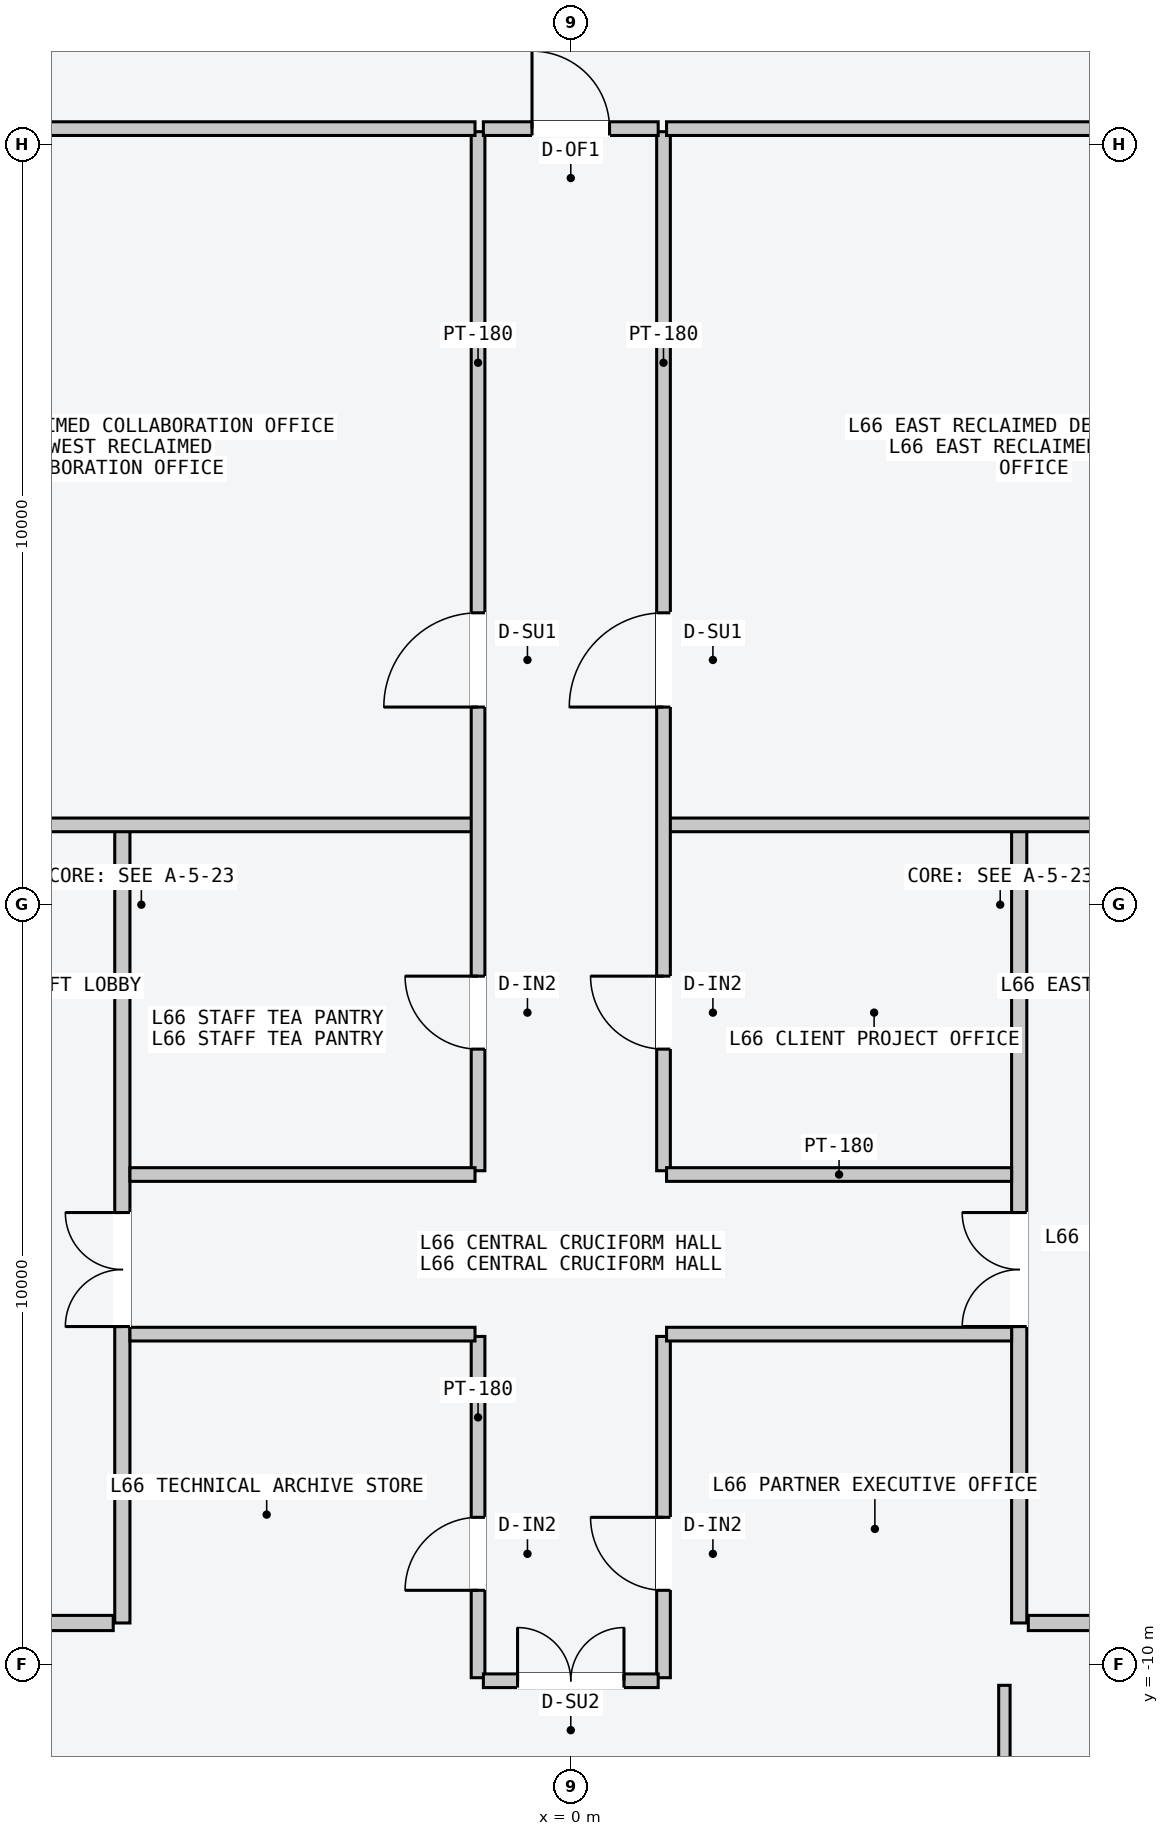
"""IFC4 building model, lengths in metres.
Left out: names, types, materials, properties, quantities, classifications, styles, units other than length and angle.
Written with IfcOpenShell. Run it as: python <this file> out.ifc"""

import sys

from ifc_helpers import new_model, si_unit, direction, frame, frame_2d, origin, place, context, subcontext, project, spatial, rectangle, extrude, element, fill, save


model = new_model("IFC4")
c1 = context("Model", 3, precision=1e-05, world=origin(), true_north=direction((0.0, 1.0)))
c2 = subcontext(c1, "Body", "Model", "MODEL_VIEW")
j1 = project(units=[si_unit("LENGTHUNIT", "METRE"), si_unit("PLANEANGLEUNIT", "RADIAN")], contexts=[c1])
p1 = place(None, origin())
s1 = spatial("IfcSite", under=j1, at=p1, CompositionType="ELEMENT")
p2 = place(p1, origin())
s2 = spatial("IfcBuilding", under=s1, at=p2, CompositionType="ELEMENT")
p3 = place(p2, frame((0.0, 0.0, 250.8)))
s3 = spatial("IfcBuildingStorey", under=s2, at=p3, CompositionType="ELEMENT", Elevation=250.8)
p4 = place(p3, frame((-5.9, -9.45, 0.0), z_axis=(0.0, 0.0, 1.0), x_axis=(0.0, 1.0, 0.0)))
e1 = element("IfcWall", 1, at=p4, inside=s3, PredefinedType="PARTITIONING", context=c2, shape_type="SweptSolid", body=[
    extrude(rectangle(XDim=10.5, YDim=0.2, at=frame_2d((5.25, 0.0))), origin(), (0.0, 0.0, 1.0), 3.4),
])
p5 = place(p4, frame((3.9, 0.0, 0.0)))
e2 = element("IfcOpeningElement", 2, at=p5, cuts=e1, PredefinedType="OPENING", context=c2, shape_type="SweptSolid", body=[
    extrude(rectangle(XDim=1.5, YDim=2.2, at=frame_2d((0.75, 1.1))), frame((0.0, 0.11, 0.0), z_axis=(0.0, -1.0, 0.0), x_axis=(1.0, 0.0, 0.0)), (0.0, 0.0, 1.0), 0.22),
])
p6 = place(p3, frame((-6.02, -9.45, 0.0), z_axis=(0.0, 0.0, 1.0), x_axis=(-1.0, 0.0, 0.0)))
e3 = element("IfcWall", 3, at=p6, inside=s3, PredefinedType="PARTITIONING", context=c2, shape_type="SweptSolid", body=[
    extrude(rectangle(XDim=1.8, YDim=0.2, at=frame_2d((0.9, 0.0))), origin(), (0.0, 0.0, 1.0), 3.4),
])
p7 = place(p3, frame((5.9, -9.45, 0.0), z_axis=(0.0, 0.0, 1.0), x_axis=(0.0, 1.0, 0.0)))
e4 = element("IfcWall", 4, at=p7, inside=s3, PredefinedType="PARTITIONING", context=c2, shape_type="SweptSolid", body=[
    extrude(rectangle(XDim=10.5, YDim=0.2, at=frame_2d((5.25, 0.0))), origin(), (0.0, 0.0, 1.0), 3.4),
])
p8 = place(p7, frame((3.9, 0.0, 0.0)))
e5 = element("IfcOpeningElement", 5, at=p8, cuts=e4, PredefinedType="OPENING", context=c2, shape_type="SweptSolid", body=[
    extrude(rectangle(XDim=1.5, YDim=2.2, at=frame_2d((0.75, 1.1))), frame((0.0, 0.11, 0.0), z_axis=(0.0, -1.0, 0.0), x_axis=(1.0, 0.0, 0.0)), (0.0, 0.0, 1.0), 0.22),
])
p9 = place(p3, frame((6.02, -9.45, 0.0), z_axis=(0.0, 0.0, 1.0), x_axis=(1.0, 0.0, 0.0)))
e6 = element("IfcWall", 6, at=p9, inside=s3, PredefinedType="PARTITIONING", context=c2, shape_type="SweptSolid", body=[
    extrude(rectangle(XDim=1.8, YDim=0.2, at=frame_2d((0.9, 0.0))), origin(), (0.0, 0.0, 1.0), 3.4),
])
p10 = place(p3, frame((-10.05, 1.05, 0.0), z_axis=(0.0, 0.0, 1.0), x_axis=(1.0, 0.0, 0.0)))
e7 = element("IfcWall", 7, at=p10, inside=s3, PredefinedType="PARTITIONING", context=c2, shape_type="SweptSolid", body=[
    extrude(rectangle(XDim=8.79, YDim=0.18, at=frame_2d((4.395, 0.0))), origin(), (0.0, 0.0, 1.0), 3.4),
])
p11 = place(p3, frame((-1.22, -3.5, 0.0), z_axis=(0.0, 0.0, 1.0), x_axis=(0.0, 1.0, 0.0)))
e8 = element("IfcWall", 8, at=p11, inside=s3, PredefinedType="PARTITIONING", context=c2, shape_type="SweptSolid", body=[
    extrude(rectangle(XDim=13.67, YDim=0.18, at=frame_2d((6.835, 0.0))), origin(), (0.0, 0.0, 1.0), 3.4),
])
p12 = place(p11, frame((6.1, 0.0, 0.0)))
e9 = element("IfcOpeningElement", 9, at=p12, cuts=e8, PredefinedType="OPENING", context=c2, shape_type="SweptSolid", body=[
    extrude(rectangle(XDim=1.24, YDim=2.24, at=frame_2d((0.62, 1.12))), frame((0.0, 0.1, 0.0), z_axis=(0.0, -1.0, 0.0), x_axis=(1.0, 0.0, 0.0)), (0.0, 0.0, 1.0), 0.2),
])
p13 = place(p11, frame((1.6, 0.0, 0.0)))
e10 = element("IfcOpeningElement", 10, at=p13, cuts=e8, PredefinedType="OPENING", context=c2, shape_type="SweptSolid", body=[
    extrude(rectangle(XDim=0.96, YDim=2.18, at=frame_2d((0.48, 1.09))), frame((0.0, 0.1, 0.0), z_axis=(0.0, -1.0, 0.0), x_axis=(1.0, 0.0, 0.0)), (0.0, 0.0, 1.0), 0.2),
])
p14 = place(p3, frame((-7.5, 10.21, 0.0), z_axis=(0.0, 0.0, 1.0), x_axis=(1.0, 0.0, 0.0)))
e11 = element("IfcWall", 11, at=p14, inside=s3, PredefinedType="PARTITIONING", context=c2, shape_type="SweptSolid", body=[
    extrude(rectangle(XDim=6.24, YDim=0.18, at=frame_2d((3.12, 0.0))), origin(), (0.0, 0.0, 1.0), 3.4),
])
p15 = place(p3, frame((-5.8, -3.55, 0.0), z_axis=(0.0, 0.0, 1.0), x_axis=(1.0, 0.0, 0.0)))
e12 = element("IfcWall", 12, at=p15, inside=s3, PredefinedType="PARTITIONING", context=c2, shape_type="SweptSolid", body=[
    extrude(rectangle(XDim=4.54, YDim=0.18, at=frame_2d((2.27, 0.0))), origin(), (0.0, 0.0, 1.0), 3.4),
])
p16 = place(p3, frame((1.26, 1.05, 0.0), z_axis=(0.0, 0.0, 1.0), x_axis=(1.0, 0.0, 0.0)))
e13 = element("IfcWall", 13, at=p16, inside=s3, PredefinedType="PARTITIONING", context=c2, shape_type="SweptSolid", body=[
    extrude(rectangle(XDim=8.8, YDim=0.18, at=frame_2d((4.4, 0.0))), origin(), (0.0, 0.0, 1.0), 3.4),
])
p17 = place(p3, frame((1.22, -3.5, 0.0), z_axis=(0.0, 0.0, 1.0), x_axis=(0.0, 1.0, 0.0)))
e14 = element("IfcWall", 14, at=p17, inside=s3, PredefinedType="PARTITIONING", context=c2, shape_type="SweptSolid", body=[
    extrude(rectangle(XDim=13.67, YDim=0.18, at=frame_2d((6.835, 0.0))), origin(), (0.0, 0.0, 1.0), 3.4),
])
p18 = place(p17, frame((6.1, 0.0, 0.0)))
e15 = element("IfcOpeningElement", 15, at=p18, cuts=e14, PredefinedType="OPENING", context=c2, shape_type="SweptSolid", body=[
    extrude(rectangle(XDim=1.24, YDim=2.24, at=frame_2d((0.62, 1.12))), frame((0.0, 0.1, 0.0), z_axis=(0.0, -1.0, 0.0), x_axis=(1.0, 0.0, 0.0)), (0.0, 0.0, 1.0), 0.2),
])
p19 = place(p17, frame((1.6, 0.0, 0.0)))
e16 = element("IfcOpeningElement", 16, at=p19, cuts=e14, PredefinedType="OPENING", context=c2, shape_type="SweptSolid", body=[
    extrude(rectangle(XDim=0.96, YDim=2.18, at=frame_2d((0.48, 1.09))), frame((0.0, 0.1, 0.0), z_axis=(0.0, -1.0, 0.0), x_axis=(1.0, 0.0, 0.0)), (0.0, 0.0, 1.0), 0.2),
])
p20 = place(p3, frame((1.26, 10.21, 0.0), z_axis=(0.0, 0.0, 1.0), x_axis=(1.0, 0.0, 0.0)))
e17 = element("IfcWall", 17, at=p20, inside=s3, PredefinedType="PARTITIONING", context=c2, shape_type="SweptSolid", body=[
    extrude(rectangle(XDim=6.24, YDim=0.18, at=frame_2d((3.12, 0.0))), origin(), (0.0, 0.0, 1.0), 3.4),
])
p21 = place(p3, frame((1.26, -3.55, 0.0), z_axis=(0.0, 0.0, 1.0), x_axis=(1.0, 0.0, 0.0)))
e18 = element("IfcWall", 18, at=p21, inside=s3, PredefinedType="PARTITIONING", context=c2, shape_type="SweptSolid", body=[
    extrude(rectangle(XDim=4.54, YDim=0.18, at=frame_2d((2.27, 0.0))), origin(), (0.0, 0.0, 1.0), 3.4),
])
p22 = place(p3, frame((-1.22, -10.17, 0.0), z_axis=(0.0, 0.0, 1.0), x_axis=(0.0, 1.0, 0.0)))
e19 = element("IfcWall", 19, at=p22, inside=s3, PredefinedType="PARTITIONING", context=c2, shape_type="SweptSolid", body=[
    extrude(rectangle(XDim=4.49, YDim=0.18, at=frame_2d((2.245, 0.0))), origin(), (0.0, 0.0, 1.0), 3.4),
])
p23 = place(p22, frame((1.15, 0.0, 0.0)))
e20 = element("IfcOpeningElement", 20, at=p23, cuts=e19, PredefinedType="OPENING", context=c2, shape_type="SweptSolid", body=[
    extrude(rectangle(XDim=0.96, YDim=2.18, at=frame_2d((0.48, 1.09))), frame((0.0, 0.1, 0.0), z_axis=(0.0, -1.0, 0.0), x_axis=(1.0, 0.0, 0.0)), (0.0, 0.0, 1.0), 0.2),
])
p24 = place(p3, frame((1.22, -10.17, 0.0), z_axis=(0.0, 0.0, 1.0), x_axis=(0.0, 1.0, 0.0)))
e21 = element("IfcWall", 21, at=p24, inside=s3, PredefinedType="PARTITIONING", context=c2, shape_type="SweptSolid", body=[
    extrude(rectangle(XDim=4.49, YDim=0.18, at=frame_2d((2.245, 0.0))), origin(), (0.0, 0.0, 1.0), 3.4),
])
p25 = place(p24, frame((1.15, 0.0, 0.0)))
e22 = element("IfcOpeningElement", 22, at=p25, cuts=e21, PredefinedType="OPENING", context=c2, shape_type="SweptSolid", body=[
    extrude(rectangle(XDim=0.96, YDim=2.18, at=frame_2d((0.48, 1.09))), frame((0.0, 0.1, 0.0), z_axis=(0.0, -1.0, 0.0), x_axis=(1.0, 0.0, 0.0)), (0.0, 0.0, 1.0), 0.2),
])
for number, where, z_axis, x_axis in (
    (23, (-5.8, -5.65, 0.0), (0.0, 0.0, 1.0), (1.0, 0.0, 0.0)),
    (24, (1.26, -5.65, 0.0), (0.0, 0.0, 1.0), (1.0, 0.0, 0.0)),
):
    element("IfcWall", number, at=place(p3, frame(where, z_axis=z_axis, x_axis=x_axis)), inside=s3, PredefinedType="PARTITIONING", context=c2, shape_type="SweptSolid", body=[
        extrude(rectangle(XDim=4.54, YDim=0.18, at=frame_2d((2.27, 0.0))), origin(), (0.0, 0.0, 1.0), 3.4),
    ])
p26 = place(p3, frame((-1.15, 10.21, 0.0), z_axis=(0.0, 0.0, 1.0), x_axis=(1.0, 0.0, 0.0)))
e25 = element("IfcWall", 25, at=p26, inside=s3, PredefinedType="PARTITIONING", context=c2, shape_type="SweptSolid", body=[
    extrude(rectangle(XDim=2.3, YDim=0.18, at=frame_2d((1.15, 0.0))), origin(), (0.0, 0.0, 1.0), 3.4),
])
p27 = place(p26, frame((0.64, 0.0, 0.0)))
e26 = element("IfcOpeningElement", 26, at=p27, cuts=e25, PredefinedType="OPENING", context=c2, shape_type="SweptSolid", body=[
    extrude(rectangle(XDim=1.02, YDim=2.2, at=frame_2d((0.51, 1.1))), frame((0.0, 0.1, 0.0), z_axis=(0.0, -1.0, 0.0), x_axis=(1.0, 0.0, 0.0)), (0.0, 0.0, 1.0), 0.2),
])
p28 = place(p3, frame((5.705, -17.56, 0.0), z_axis=(0.0, 0.0, 1.0), x_axis=(0.0, 1.0, 0.0)))
e27 = element("IfcWall", 27, at=p28, inside=s3, PredefinedType="PARTITIONING", context=c2, shape_type="SweptSolid", body=[
    extrude(rectangle(XDim=7.29, YDim=0.15, at=frame_2d((3.645, 0.0))), origin(), (0.0, 0.0, 1.0), 3.4),
])
p29 = place(p28, frame((1.05, 0.0, 0.0)))
e28 = element("IfcOpeningElement", 28, at=p29, cuts=e27, PredefinedType="OPENING", context=c2, shape_type="SweptSolid", body=[
    extrude(rectangle(XDim=0.96, YDim=2.18, at=frame_2d((0.48, 1.09))), frame((0.0, 0.085, 0.0), z_axis=(0.0, -1.0, 0.0), x_axis=(1.0, 0.0, 0.0)), (0.0, 0.0, 1.0), 0.17),
])
p30 = place(p3, frame((-1.15, -10.21, 0.0), z_axis=(0.0, 0.0, 1.0), x_axis=(1.0, 0.0, 0.0)))
e29 = element("IfcWall", 29, at=p30, inside=s3, PredefinedType="PARTITIONING", context=c2, shape_type="SweptSolid", body=[
    extrude(rectangle(XDim=2.3, YDim=0.18, at=frame_2d((1.15, 0.0))), origin(), (0.0, 0.0, 1.0), 3.4),
])
p31 = place(p30, frame((0.45, 0.0, 0.0)))
e30 = element("IfcOpeningElement", 30, at=p31, cuts=e29, PredefinedType="OPENING", context=c2, shape_type="SweptSolid", body=[
    extrude(rectangle(XDim=1.4, YDim=2.2, at=frame_2d((0.7, 1.1))), frame((0.0, 0.1, 0.0), z_axis=(0.0, -1.0, 0.0), x_axis=(1.0, 0.0, 0.0)), (0.0, 0.0, 1.0), 0.2),
])
p32 = place(p5, origin())
e31 = element("IfcDoor", 31, at=p32, inside=s3, OperationType="DOUBLE_DOOR_SINGLE_SWING", PredefinedType="DOOR", context=c2, shape_type="SweptSolid", body=[
    extrude(rectangle(XDim=1.5, YDim=2.2, at=frame_2d((0.75, 1.1))), frame((0.0, 0.025, 0.0), z_axis=(0.0, -1.0, 0.0), x_axis=(1.0, 0.0, 0.0)), (0.0, 0.0, 1.0), 0.05),
])
fill(e2, e31)
p33 = place(p8, origin())
e32 = element("IfcDoor", 32, at=p33, inside=s3, OperationType="DOUBLE_DOOR_SINGLE_SWING", PredefinedType="DOOR", context=c2, shape_type="SweptSolid", body=[
    extrude(rectangle(XDim=1.5, YDim=2.2, at=frame_2d((0.75, 1.1))), frame((0.0, 0.025, 0.0), z_axis=(0.0, -1.0, 0.0), x_axis=(1.0, 0.0, 0.0)), (0.0, 0.0, 1.0), 0.05),
])
fill(e5, e32)
p34 = place(p12, origin())
e33 = element("IfcDoor", 33, at=p34, inside=s3, OperationType="SINGLE_SWING_LEFT", PredefinedType="DOOR", context=c2, shape_type="SweptSolid", body=[
    extrude(rectangle(XDim=1.24, YDim=2.24, at=frame_2d((0.62, 1.12))), frame((0.0, 0.025, 0.0), z_axis=(0.0, -1.0, 0.0), x_axis=(1.0, 0.0, 0.0)), (0.0, 0.0, 1.0), 0.05),
])
fill(e9, e33)
p35 = place(p13, origin())
e34 = element("IfcDoor", 34, at=p35, inside=s3, OperationType="SINGLE_SWING_RIGHT", PredefinedType="DOOR", context=c2, shape_type="SweptSolid", body=[
    extrude(rectangle(XDim=0.96, YDim=2.18, at=frame_2d((0.48, 1.09))), frame((0.0, 0.025, 0.0), z_axis=(0.0, -1.0, 0.0), x_axis=(1.0, 0.0, 0.0)), (0.0, 0.0, 1.0), 0.05),
])
fill(e10, e34)
p36 = place(p18, origin())
e35 = element("IfcDoor", 35, at=p36, inside=s3, OperationType="SINGLE_SWING_LEFT", PredefinedType="DOOR", context=c2, shape_type="SweptSolid", body=[
    extrude(rectangle(XDim=1.24, YDim=2.24, at=frame_2d((0.62, 1.12))), frame((0.0, 0.025, 0.0), z_axis=(0.0, -1.0, 0.0), x_axis=(1.0, 0.0, 0.0)), (0.0, 0.0, 1.0), 0.05),
])
fill(e15, e35)
p37 = place(p19, origin())
e36 = element("IfcDoor", 36, at=p37, inside=s3, OperationType="SINGLE_SWING_RIGHT", PredefinedType="DOOR", context=c2, shape_type="SweptSolid", body=[
    extrude(rectangle(XDim=0.96, YDim=2.18, at=frame_2d((0.48, 1.09))), frame((0.0, 0.025, 0.0), z_axis=(0.0, -1.0, 0.0), x_axis=(1.0, 0.0, 0.0)), (0.0, 0.0, 1.0), 0.05),
])
fill(e16, e36)
p38 = place(p23, origin())
e37 = element("IfcDoor", 37, at=p38, inside=s3, OperationType="SINGLE_SWING_LEFT", PredefinedType="DOOR", context=c2, shape_type="SweptSolid", body=[
    extrude(rectangle(XDim=0.96, YDim=2.18, at=frame_2d((0.48, 1.09))), frame((0.0, 0.025, 0.0), z_axis=(0.0, -1.0, 0.0), x_axis=(1.0, 0.0, 0.0)), (0.0, 0.0, 1.0), 0.05),
])
fill(e20, e37)
p39 = place(p25, origin())
e38 = element("IfcDoor", 38, at=p39, inside=s3, OperationType="SINGLE_SWING_RIGHT", PredefinedType="DOOR", context=c2, shape_type="SweptSolid", body=[
    extrude(rectangle(XDim=0.96, YDim=2.18, at=frame_2d((0.48, 1.09))), frame((0.0, 0.025, 0.0), z_axis=(0.0, -1.0, 0.0), x_axis=(1.0, 0.0, 0.0)), (0.0, 0.0, 1.0), 0.05),
])
fill(e22, e38)
p40 = place(p27, origin())
e39 = element("IfcDoor", 39, at=p40, inside=s3, OperationType="SINGLE_SWING_LEFT", PredefinedType="DOOR", context=c2, shape_type="SweptSolid", body=[
    extrude(rectangle(XDim=1.02, YDim=2.2, at=frame_2d((0.51, 1.1))), frame((0.0, 0.025, 0.0), z_axis=(0.0, -1.0, 0.0), x_axis=(1.0, 0.0, 0.0)), (0.0, 0.0, 1.0), 0.05),
])
fill(e26, e39)
p41 = place(p31, origin())
e40 = element("IfcDoor", 40, at=p41, inside=s3, OperationType="DOUBLE_DOOR_SINGLE_SWING", PredefinedType="DOOR", context=c2, shape_type="SweptSolid", body=[
    extrude(rectangle(XDim=1.4, YDim=2.2, at=frame_2d((0.7, 1.1))), frame((0.0, 0.025, 0.0), z_axis=(0.0, -1.0, 0.0), x_axis=(1.0, 0.0, 0.0)), (0.0, 0.0, 1.0), 0.05),
])
fill(e30, e40)
save(model, sys.argv[1])
